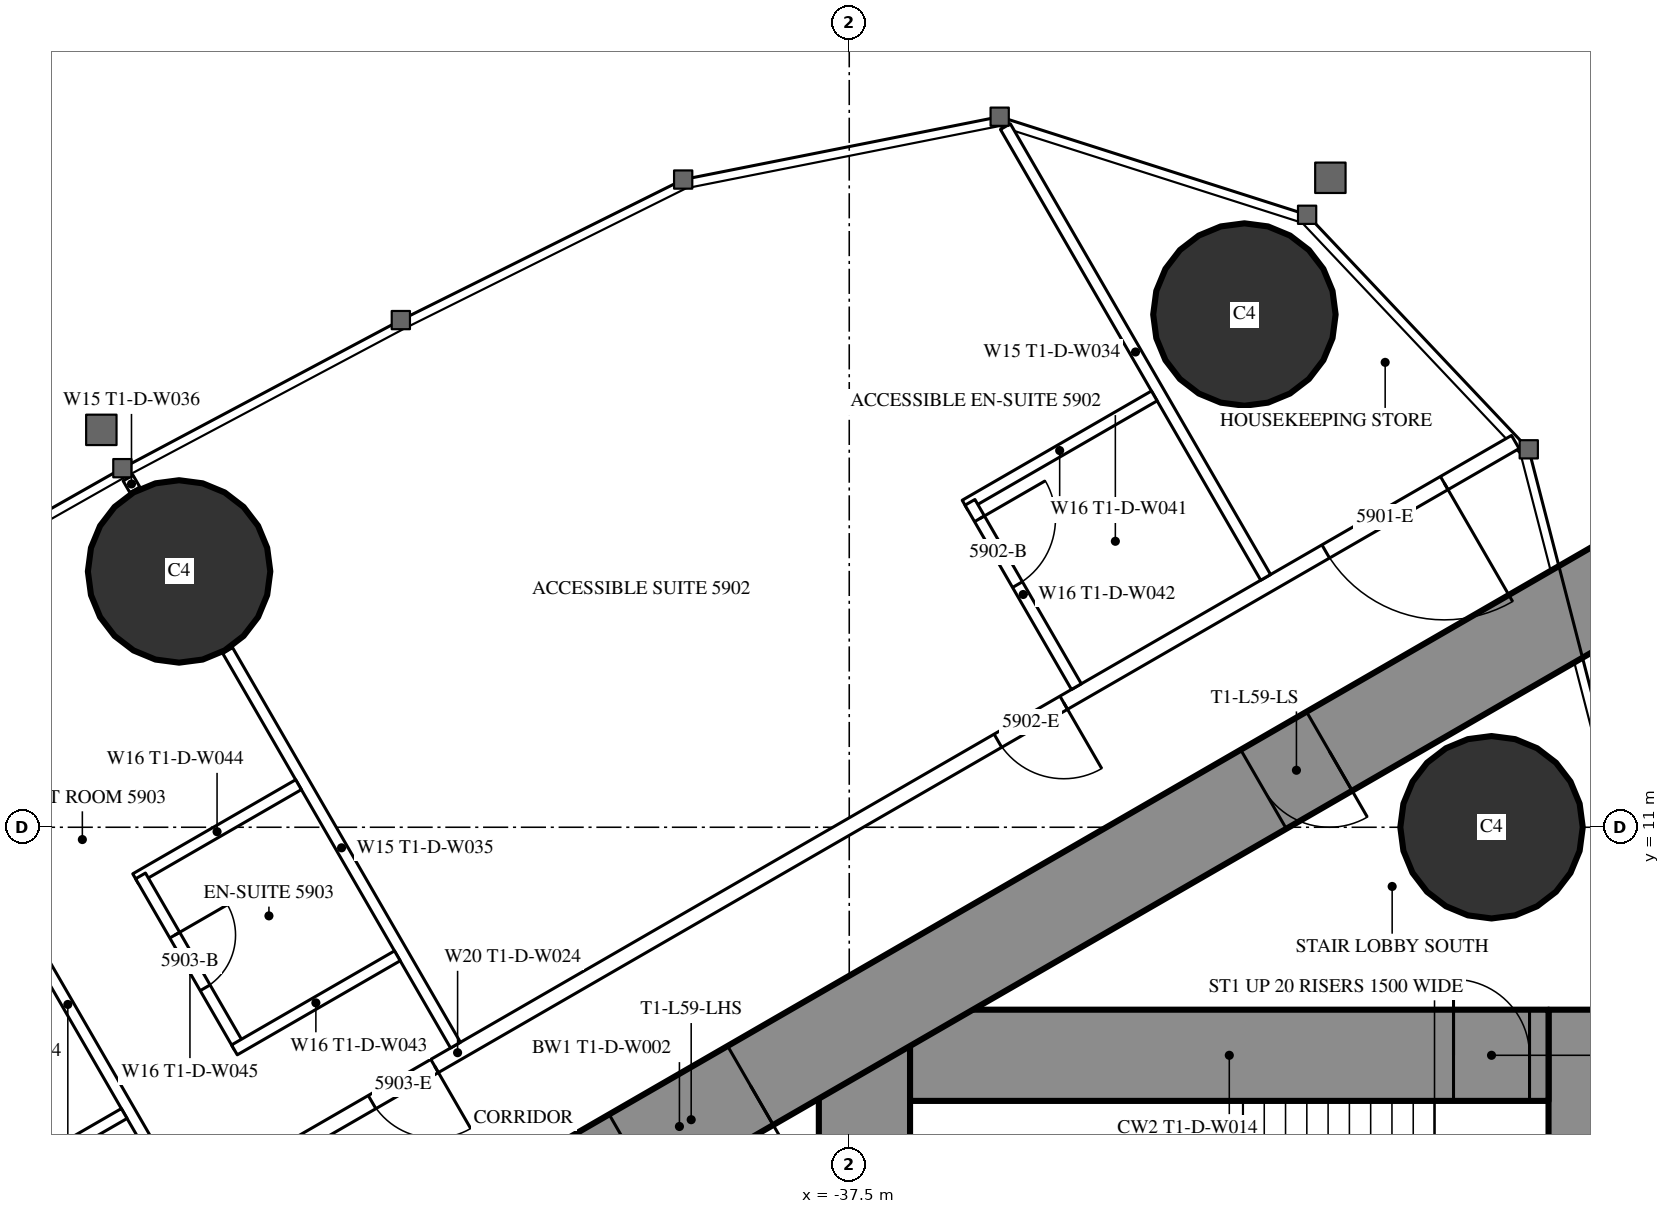
"""IFC4 building model, lengths in metres.
Left out: names, types, materials, properties, quantities, classifications, styles, units other than length and angle.
Written with IfcOpenShell. Run it as: python <this file> out.ifc"""

import sys

from ifc_helpers import new_model, si_unit, direction, frame, frame_2d, origin, origin_2d, place, context, subcontext, project, spatial, rectangle, circle, extrude, element, fill, save


model = new_model("IFC4")
c1 = context("Model", 3, precision=1e-05, world=origin(), true_north=direction((0.0, 1.0)))
c2 = subcontext(c1, "Body", "Model", "MODEL_VIEW")
j1 = project(units=[si_unit("LENGTHUNIT", "METRE"), si_unit("PLANEANGLEUNIT", "RADIAN")], contexts=[c1])
p1 = place(None, origin())
s1 = spatial("IfcSite", under=j1, at=p1, CompositionType="ELEMENT")
p2 = place(p1, origin())
s2 = spatial("IfcBuilding", under=s1, at=p2, CompositionType="ELEMENT")
p3 = place(p2, frame((0.0, 0.0, 222.5)))
s3 = spatial("IfcBuildingStorey", under=s2, at=p3, CompositionType="ELEMENT", Elevation=222.5)
for number, where, z_axis, x_axis in (
    (1, (-32.301, 17.745, 0.0), (0.0, 0.0, 1.0), (1.0, 0.0, 0.0)),
    (2, (-29.05, 11.0, 0.0), (0.0, 0.0, 1.0), (1.0, 0.0, 0.0)),
    (3, (-46.317, 14.365, 0.0), (0.0, 0.0, 1.0), (1.0, 0.0, 0.0)),
):
    element("IfcColumn", number, at=place(p3, frame(where, z_axis=z_axis, x_axis=x_axis)), inside=s3, PredefinedType="COLUMN", context=c2, shape_type="SweptSolid", body=[
        extrude(circle(Radius=1.2, at=origin_2d()), origin(), (0.0, 0.0, 1.0), 3.6),
    ])
p4 = place(p3, frame((-27.9, 8.6, 0.0), z_axis=(0.0, 0.0, 1.0), x_axis=(0.0, -1.0, 0.0)))
e4 = element("IfcWall", 4, at=p4, inside=s3, PredefinedType="SHEAR", context=c2, shape_type="SweptSolid", body=[
    extrude(rectangle(XDim=17.2, YDim=0.8, at=frame_2d((8.6, 0.0))), origin(), (0.0, 0.0, 1.0), 3.6),
])
p5 = place(p4, frame((6.95, 0.0, 0.0)))
e5 = element("IfcOpeningElement", 5, at=p5, cuts=e4, PredefinedType="OPENING", context=c2, shape_type="SweptSolid", body=[
    extrude(rectangle(XDim=0.9, YDim=2.2, at=frame_2d((0.45, 1.1))), frame((0.0, 0.41, 0.0), z_axis=(0.0, -1.0, 0.0), x_axis=(1.0, 0.0, 0.0)), (0.0, 0.0, 1.0), 0.82),
])
p6 = place(p3, frame((-37.3, 8.6, 0.0), z_axis=(0.0, 0.0, 1.0), x_axis=(0.0, -1.0, 0.0)))
e6 = element("IfcWall", 6, at=p6, inside=s3, PredefinedType="SHEAR", context=c2, shape_type="SweptSolid", body=[
    extrude(rectangle(XDim=17.2, YDim=1.2, at=frame_2d((8.6, 0.0))), origin(), (0.0, 0.0, 1.0), 3.6),
])
p7 = place(p6, frame((7.7, 0.0, 0.0)))
e7 = element("IfcOpeningElement", 7, at=p7, cuts=e6, PredefinedType="OPENING", context=c2, shape_type="SweptSolid", body=[
    extrude(rectangle(XDim=1.8, YDim=2.2, at=frame_2d((0.9, 1.1))), frame((0.0, 0.61, 0.0), z_axis=(0.0, -1.0, 0.0), x_axis=(1.0, 0.0, 0.0)), (0.0, 0.0, 1.0), 1.22),
])
p8 = place(p3, frame((-28.3, 8.0, 0.0), z_axis=(0.0, 0.0, 1.0), x_axis=(-1.0, 0.0, 0.0)))
e8 = element("IfcWall", 8, at=p8, inside=s3, PredefinedType="SHEAR", context=c2, shape_type="SweptSolid", body=[
    extrude(rectangle(XDim=8.4, YDim=1.2, at=frame_2d((4.2, 0.0))), origin(), (0.0, 0.0, 1.0), 3.6),
])
p9 = place(p8, frame((0.25, 0.0, 0.0)))
e9 = element("IfcOpeningElement", 9, at=p9, cuts=e8, PredefinedType="OPENING", context=c2, shape_type="SweptSolid", body=[
    extrude(rectangle(XDim=1.0, YDim=2.2, at=frame_2d((0.5, 1.1))), frame((0.0, 0.61, 0.0), z_axis=(0.0, -1.0, 0.0), x_axis=(1.0, 0.0, 0.0)), (0.0, 0.0, 1.0), 1.22),
])
p10 = place(p3, frame((-27.2, 14.3, 0.0), z_axis=(0.0, 0.0, 1.0), x_axis=(-0.866026593062, -0.499997940104, 0.0)))
e10 = element("IfcWall", 10, at=p10, inside=s3, PredefinedType="SHEAR", context=c2, shape_type="SweptSolid", body=[
    extrude(rectangle(XDim=28.946, YDim=1.2, at=frame_2d((14.473, 0.0))), origin(), (0.0, 0.0, 1.0), 3.6),
])
p11 = place(p10, frame((4.6, 0.0, 0.0)))
e11 = element("IfcOpeningElement", 11, at=p11, cuts=e10, PredefinedType="OPENING", context=c2, shape_type="SweptSolid", body=[
    extrude(rectangle(XDim=1.0, YDim=2.2, at=frame_2d((0.5, 1.1))), frame((0.0, 0.61, 0.0), z_axis=(0.0, -1.0, 0.0), x_axis=(1.0, 0.0, 0.0)), (0.0, 0.0, 1.0), 1.22),
])
p12 = place(p10, frame((13.395, 0.0, 0.0)))
e12 = element("IfcOpeningElement", 12, at=p12, cuts=e10, PredefinedType="OPENING", context=c2, shape_type="SweptSolid", body=[
    extrude(rectangle(XDim=1.8, YDim=2.2, at=frame_2d((0.9, 1.1))), frame((0.0, 0.61, 0.0), z_axis=(0.0, -1.0, 0.0), x_axis=(1.0, 0.0, 0.0)), (0.0, 0.0, 1.0), 1.22),
])
p13 = place(p3, frame((-28.737, 16.068, 0.0), z_axis=(0.0, 0.0, 1.0), x_axis=(-0.866026057212, -0.499998868229, 0.0)))
e13 = element("IfcWall", 13, at=p13, inside=s3, PredefinedType="PARTITIONING", context=c2, shape_type="SweptSolid", body=[
    extrude(rectangle(XDim=32.137, YDim=0.2, at=frame_2d((16.068, 0.0))), origin(), (0.0, 0.0, 1.0), 3.35),
])
p14 = place(p13, frame((1.08, 0.0, 0.0)))
e14 = element("IfcOpeningElement", 14, at=p14, cuts=e13, PredefinedType="OPENING", context=c2, shape_type="SweptSolid", body=[
    extrude(rectangle(XDim=1.8, YDim=2.03, at=frame_2d((0.9, 1.015))), frame((0.0, 0.11, 0.0), z_axis=(0.0, -1.0, 0.0), x_axis=(1.0, 0.0, 0.0)), (0.0, 0.0, 1.0), 0.22),
])
p15 = place(p13, frame((6.86, 0.0, 0.0)))
e15 = element("IfcOpeningElement", 15, at=p15, cuts=e13, PredefinedType="OPENING", context=c2, shape_type="SweptSolid", body=[
    extrude(rectangle(XDim=1.0, YDim=2.2, at=frame_2d((0.5, 1.1))), frame((0.0, 0.11, 0.0), z_axis=(0.0, -1.0, 0.0), x_axis=(1.0, 0.0, 0.0)), (0.0, 0.0, 1.0), 0.22),
])
p16 = place(p13, frame((16.418, 0.0, 0.0)))
e16 = element("IfcOpeningElement", 16, at=p16, cuts=e13, PredefinedType="OPENING", context=c2, shape_type="SweptSolid", body=[
    extrude(rectangle(XDim=0.95, YDim=2.2, at=frame_2d((0.475, 1.1))), frame((0.0, 0.11, 0.0), z_axis=(0.0, -1.0, 0.0), x_axis=(1.0, 0.0, 0.0)), (0.0, 0.0, 1.0), 0.22),
])
p17 = place(p13, frame((20.567, 0.0, 0.0)))
e17 = element("IfcOpeningElement", 17, at=p17, cuts=e13, PredefinedType="OPENING", context=c2, shape_type="SweptSolid", body=[
    extrude(rectangle(XDim=0.95, YDim=2.2, at=frame_2d((0.475, 1.1))), frame((0.0, 0.11, 0.0), z_axis=(0.0, -1.0, 0.0), x_axis=(1.0, 0.0, 0.0)), (0.0, 0.0, 1.0), 0.22),
])
p18 = place(p13, frame((27.065, 0.0, 0.0)))
e18 = element("IfcOpeningElement", 18, at=p18, cuts=e13, PredefinedType="OPENING", context=c2, shape_type="SweptSolid", body=[
    extrude(rectangle(XDim=0.95, YDim=2.2, at=frame_2d((0.475, 1.1))), frame((0.0, 0.11, 0.0), z_axis=(0.0, -1.0, 0.0), x_axis=(1.0, 0.0, 0.0)), (0.0, 0.0, 1.0), 0.22),
])
p19 = place(p3, frame((-32.022, 14.287, 0.0), z_axis=(0.0, 0.0, 1.0), x_axis=(-0.50000019414, 0.866025291697, 0.0)))
e19 = element("IfcWall", 19, at=p19, inside=s3, PredefinedType="PARTITIONING", context=c2, shape_type="SweptSolid", body=[
    extrude(rectangle(XDim=6.848, YDim=0.15, at=frame_2d((3.424, 0.0))), origin(), (0.0, 0.0, 1.0), 3.35),
])
p20 = place(p3, frame((-42.68, 8.134, 0.0), z_axis=(0.0, 0.0, 1.0), x_axis=(-0.499984479505, 0.866034364361, 0.0)))
e20 = element("IfcWall", 20, at=p20, inside=s3, PredefinedType="PARTITIONING", context=c2, shape_type="SweptSolid", body=[
    extrude(rectangle(XDim=5.995, YDim=0.15, at=frame_2d((2.998, 0.0))), origin(), (0.0, 0.0, 1.0), 2.45),
])
p21 = place(p3, frame((-46.898, 15.439, 0.0), z_axis=(0.0, 0.0, 1.0), x_axis=(-0.500232303069, 0.865891241997, 0.0)))
e21 = element("IfcWall", 21, at=p21, inside=s3, PredefinedType="PARTITIONING", context=c2, shape_type="SweptSolid", body=[
    extrude(rectangle(XDim=0.18, YDim=0.15, at=frame_2d((0.09, 0.0))), origin(), (0.0, 0.0, 1.0), 2.45),
])
p22 = place(p3, frame((-46.274, 6.059, 0.0), z_axis=(0.0, 0.0, 1.0), x_axis=(-0.500020471368, 0.866013584312, 0.0)))
e22 = element("IfcWall", 22, at=p22, inside=s3, PredefinedType="PARTITIONING", context=c2, shape_type="SweptSolid", body=[
    extrude(rectangle(XDim=6.028, YDim=0.15, at=frame_2d((3.014, 0.0))), origin(), (0.0, 0.0, 1.0), 2.45),
])
p23 = place(p3, frame((-33.487, 16.675, 0.0), z_axis=(0.0, 0.0, 1.0), x_axis=(-0.866039941686, -0.499974818771, 0.0)))
e23 = element("IfcWall", 23, at=p23, inside=s3, PredefinedType="PARTITIONING", context=c2, shape_type="SweptSolid", body=[
    extrude(rectangle(XDim=2.875, YDim=0.15, at=frame_2d((1.438, 0.0))), origin(), (0.0, 0.0, 1.0), 3.35),
])
p24 = place(p3, frame((-34.511, 12.85, 0.0), z_axis=(0.0, 0.0, 1.0), x_axis=(-0.500011755427, 0.866018616679, 0.0)))
e24 = element("IfcWall", 24, at=p24, inside=s3, PredefinedType="PARTITIONING", context=c2, shape_type="SweptSolid", body=[
    extrude(rectangle(XDim=2.8, YDim=0.15, at=frame_2d((1.4, 0.0))), origin(), (0.0, 0.0, 1.0), 3.35),
])
p25 = place(p24, frame((1.55, 0.0, 0.0)))
e25 = element("IfcOpeningElement", 25, at=p25, cuts=e24, PredefinedType="OPENING", context=c2, shape_type="SweptSolid", body=[
    extrude(rectangle(XDim=1.0, YDim=2.2, at=frame_2d((0.5, 1.1))), frame((0.0, 0.085, 0.0), z_axis=(0.0, -1.0, 0.0), x_axis=(1.0, 0.0, 0.0)), (0.0, 0.0, 1.0), 0.17),
])
p26 = place(p3, frame((-44.745, 11.56, 0.0), z_axis=(0.0, 0.0, 1.0), x_axis=(-0.866006523861, -0.500032699561, 0.0)))
e26 = element("IfcWall", 26, at=p26, inside=s3, PredefinedType="PARTITIONING", context=c2, shape_type="SweptSolid", body=[
    extrude(rectangle(XDim=2.475, YDim=0.15, at=frame_2d((1.237, 0.0))), origin(), (0.0, 0.0, 1.0), 3.35),
])
p27 = place(p3, frame((-45.524, 8.109, 0.0), z_axis=(0.0, 0.0, 1.0), x_axis=(-0.49997716683, 0.86603858612, 0.0)))
e27 = element("IfcWall", 27, at=p27, inside=s3, PredefinedType="PARTITIONING", context=c2, shape_type="SweptSolid", body=[
    extrude(rectangle(XDim=2.6, YDim=0.15, at=frame_2d((1.3, 0.0))), origin(), (0.0, 0.0, 1.0), 3.35),
])
p28 = place(p27, frame((0.9, 0.0, 0.0)))
e28 = element("IfcOpeningElement", 28, at=p28, cuts=e27, PredefinedType="OPENING", context=c2, shape_type="SweptSolid", body=[
    extrude(rectangle(XDim=0.8, YDim=2.2, at=frame_2d((0.4, 1.1))), frame((0.0, 0.085, 0.0), z_axis=(0.0, -1.0, 0.0), x_axis=(1.0, 0.0, 0.0)), (0.0, 0.0, 1.0), 0.17),
])
for number, where, z_axis, x_axis in (
    (29, (-43.445, 9.309, 0.0), (0.0, 0.0, 1.0), (-0.866, -0.5, 0.0)),
    (30, (-47.039, 7.234, 0.0), (0.0, 0.0, 1.0), (-0.866, -0.5, 0.0)),
):
    element("IfcWall", number, at=place(p3, frame(where, z_axis=z_axis, x_axis=x_axis)), inside=s3, PredefinedType="PARTITIONING", context=c2, shape_type="SweptSolid", body=[
        extrude(rectangle(XDim=2.475, YDim=0.15, at=frame_2d((1.238, 0.0))), origin(), (0.0, 0.0, 1.0), 3.35),
    ])
p29 = place(p14, origin())
e31 = element("IfcDoor", 31, at=p29, inside=s3, OperationType="DOUBLE_DOOR_SINGLE_SWING", PredefinedType="DOOR", context=c2, shape_type="SweptSolid", body=[
    extrude(rectangle(XDim=1.8, YDim=2.03, at=frame_2d((0.9, 1.015))), frame((0.0, 0.025, 0.0), z_axis=(0.0, -1.0, 0.0), x_axis=(1.0, 0.0, 0.0)), (0.0, 0.0, 1.0), 0.05),
])
fill(e14, e31)
p30 = place(p25, origin())
e32 = element("IfcDoor", 32, at=p30, inside=s3, OperationType="SINGLE_SWING_RIGHT", PredefinedType="DOOR", context=c2, shape_type="SweptSolid", body=[
    extrude(rectangle(XDim=1.0, YDim=2.2, at=frame_2d((0.5, 1.1))), frame((0.0, 0.025, 0.0), z_axis=(0.0, -1.0, 0.0), x_axis=(1.0, 0.0, 0.0)), (0.0, 0.0, 1.0), 0.05),
])
fill(e25, e32)
p31 = place(p15, origin())
e33 = element("IfcDoor", 33, at=p31, inside=s3, OperationType="SINGLE_SWING_LEFT", PredefinedType="DOOR", context=c2, shape_type="SweptSolid", body=[
    extrude(rectangle(XDim=1.0, YDim=2.2, at=frame_2d((0.5, 1.1))), frame((0.0, 0.025, 0.0), z_axis=(0.0, -1.0, 0.0), x_axis=(1.0, 0.0, 0.0)), (0.0, 0.0, 1.0), 0.05),
])
fill(e15, e33)
p32 = place(p28, origin())
e34 = element("IfcDoor", 34, at=p32, inside=s3, OperationType="SINGLE_SWING_RIGHT", PredefinedType="DOOR", context=c2, shape_type="SweptSolid", body=[
    extrude(rectangle(XDim=0.8, YDim=2.2, at=frame_2d((0.4, 1.1))), frame((0.0, 0.025, 0.0), z_axis=(0.0, -1.0, 0.0), x_axis=(1.0, 0.0, 0.0)), (0.0, 0.0, 1.0), 0.05),
])
fill(e28, e34)
p33 = place(p16, origin())
e35 = element("IfcDoor", 35, at=p33, inside=s3, OperationType="SINGLE_SWING_LEFT", PredefinedType="DOOR", context=c2, shape_type="SweptSolid", body=[
    extrude(rectangle(XDim=0.95, YDim=2.2, at=frame_2d((0.475, 1.1))), frame((0.0, 0.025, 0.0), z_axis=(0.0, -1.0, 0.0), x_axis=(1.0, 0.0, 0.0)), (0.0, 0.0, 1.0), 0.05),
])
fill(e16, e35)
p34 = place(p11, origin())
e36 = element("IfcDoor", 36, at=p34, inside=s3, OperationType="SINGLE_SWING_LEFT", PredefinedType="DOOR", context=c2, shape_type="SweptSolid", body=[
    extrude(rectangle(XDim=1.0, YDim=2.2, at=frame_2d((0.5, 1.1))), frame((0.0, 0.025, 0.0), z_axis=(0.0, -1.0, 0.0), x_axis=(1.0, 0.0, 0.0)), (0.0, 0.0, 1.0), 0.05),
])
fill(e11, e36)
p35 = place(p12, origin())
e37 = element("IfcDoor", 37, at=p35, inside=s3, OperationType="DOUBLE_DOOR_SINGLE_SWING", PredefinedType="DOOR", context=c2, shape_type="SweptSolid", body=[
    extrude(rectangle(XDim=1.8, YDim=2.2, at=frame_2d((0.9, 1.1))), frame((0.0, 0.025, 0.0), z_axis=(0.0, -1.0, 0.0), x_axis=(1.0, 0.0, 0.0)), (0.0, 0.0, 1.0), 0.05),
])
fill(e12, e37)
p36 = place(p9, origin())
e38 = element("IfcDoor", 38, at=p36, inside=s3, OperationType="SINGLE_SWING_RIGHT", PredefinedType="DOOR", context=c2, shape_type="SweptSolid", body=[
    extrude(rectangle(XDim=1.0, YDim=2.2, at=frame_2d((0.5, 1.1))), frame((0.0, 0.025, 0.0), z_axis=(0.0, -1.0, 0.0), x_axis=(1.0, 0.0, 0.0)), (0.0, 0.0, 1.0), 0.05),
])
fill(e9, e38)
save(model, sys.argv[1])
